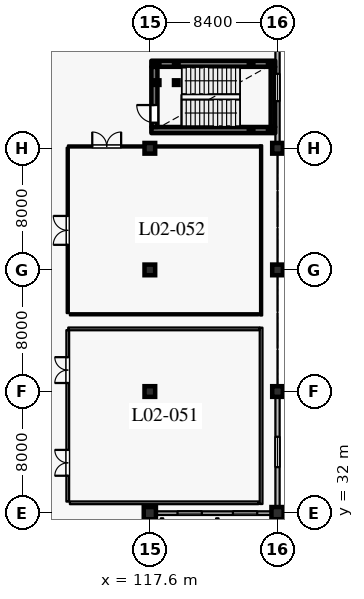
"""IFC4 building model, lengths in metres.
Left out: names, types, materials, properties, quantities, classifications, styles, units other than length and angle.
Written with IfcOpenShell. Run it as: python <this file> out.ifc"""

import sys

from ifc_helpers import new_model, si_unit, direction, frame, frame_2d, origin, origin_2d, place, context, subcontext, project, spatial, rectangle, hollow_rectangle, extrude, element, fill, save


model = new_model("IFC4")
c1 = context("Model", 3, precision=1e-05, world=origin(), true_north=direction((0.0, 1.0)))
c2 = subcontext(c1, "Body", "Model", "MODEL_VIEW")
j1 = project(units=[si_unit("LENGTHUNIT", "METRE"), si_unit("PLANEANGLEUNIT", "RADIAN")], contexts=[c1])
p1 = place(None, origin())
s1 = spatial("IfcSite", under=j1, at=p1, CompositionType="ELEMENT")
p2 = place(p1, origin())
s2 = spatial("IfcBuilding", under=s1, at=p2, CompositionType="ELEMENT")
p3 = place(p2, frame((0.0, 0.0, 11.4)))
s3 = spatial("IfcBuildingStorey", under=s2, at=p3, CompositionType="ELEMENT", Elevation=11.4)
p4 = place(p3, frame((117.6, 32.0, 0.0), z_axis=(0.0, 0.0, 1.0), x_axis=(1.0, 0.0, 0.0)))
e1 = element("IfcColumn", 1, at=p4, inside=s3, PredefinedType="COLUMN", context=c2, shape_type="SweptSolid", body=[
    extrude(rectangle(XDim=0.8, YDim=0.8, at=origin_2d()), origin(), (0.0, 0.0, 1.0), 4.8),
])
for number, where, z_axis, x_axis in (
    (2, (117.6, 40.0, 0.0), (0.0, 0.0, 1.0), (1.0, 0.0, 0.0)),
    (3, (117.6, 48.0, 0.0), (0.0, 0.0, 1.0), (1.0, 0.0, 0.0)),
    (4, (117.6, 56.0, 0.0), (0.0, 0.0, 1.0), (1.0, 0.0, 0.0)),
):
    element("IfcColumn", number, at=place(p3, frame(where, z_axis=z_axis, x_axis=x_axis)), inside=s3, PredefinedType="COLUMN", context=c2, shape_type="SweptSolid", body=[
        extrude(rectangle(XDim=0.7, YDim=0.7, at=origin_2d()), origin(), (0.0, 0.0, 1.0), 4.8),
    ])
p5 = place(p3, frame((126.0, 32.0, 0.0), z_axis=(0.0, 0.0, 1.0), x_axis=(1.0, 0.0, 0.0)))
e5 = element("IfcColumn", 5, at=p5, inside=s3, PredefinedType="COLUMN", context=c2, shape_type="SweptSolid", body=[
    extrude(rectangle(XDim=0.8, YDim=0.8, at=origin_2d()), origin(), (0.0, 0.0, 1.0), 4.8),
])
for number, where, z_axis, x_axis in (
    (6, (126.0, 40.0, 0.0), (0.0, 0.0, 1.0), (1.0, 0.0, 0.0)),
    (7, (126.0, 48.0, 0.0), (0.0, 0.0, 1.0), (1.0, 0.0, 0.0)),
    (8, (126.0, 56.0, 0.0), (0.0, 0.0, 1.0), (1.0, 0.0, 0.0)),
):
    element("IfcColumn", number, at=place(p3, frame(where, z_axis=z_axis, x_axis=x_axis)), inside=s3, PredefinedType="COLUMN", context=c2, shape_type="SweptSolid", body=[
        extrude(rectangle(XDim=0.7, YDim=0.7, at=origin_2d()), origin(), (0.0, 0.0, 1.0), 4.8),
    ])
p6 = place(p3, frame((126.0, 63.65, 0.0), z_axis=(0.0, 0.0, 1.0), x_axis=(0.0, -1.0, 0.0)))
e9 = element("IfcWall", 9, at=p6, inside=s3, PredefinedType="SOLIDWALL", context=c2, shape_type="SweptSolid", body=[
    extrude(rectangle(XDim=7.3, YDim=0.28, at=frame_2d((3.65, 0.0))), origin(), (0.0, 0.0, 1.0), 4.5),
])
p7 = place(p6, frame((2.75, 0.0, 1.0)))
e10 = element("IfcOpeningElement", 10, at=p7, cuts=e9, PredefinedType="OPENING", context=c2, shape_type="SweptSolid", body=[
    extrude(rectangle(XDim=1.8, YDim=1.7, at=frame_2d((0.9, 0.85))), frame((0.0, 0.15, 0.0), z_axis=(0.0, -1.0, 0.0), x_axis=(1.0, 0.0, 0.0)), (0.0, 0.0, 1.0), 0.3),
])
p8 = place(p3, frame((126.0, 39.65, 0.0), z_axis=(0.0, 0.0, 1.0), x_axis=(0.0, -1.0, 0.0)))
e11 = element("IfcWall", 11, at=p8, inside=s3, PredefinedType="SOLIDWALL", context=c2, shape_type="SweptSolid", body=[
    extrude(rectangle(XDim=7.25, YDim=0.28, at=frame_2d((3.625, 0.0))), origin(), (0.0, 0.0, 1.0), 4.5),
])
p9 = place(p8, frame((2.625, 0.0, 1.0)))
e12 = element("IfcOpeningElement", 12, at=p9, cuts=e11, PredefinedType="OPENING", context=c2, shape_type="SweptSolid", body=[
    extrude(rectangle(XDim=2.0, YDim=1.75, at=frame_2d((1.0, 0.875))), frame((0.0, 0.15, 0.0), z_axis=(0.0, -1.0, 0.0), x_axis=(1.0, 0.0, 0.0)), (0.0, 0.0, 1.0), 0.3),
])
p10 = place(p3, frame((118.0, 32.0, 0.0), z_axis=(0.0, 0.0, 1.0), x_axis=(1.0, 0.0, 0.0)))
e13 = element("IfcWall", 13, at=p10, inside=s3, PredefinedType="SOLIDWALL", context=c2, shape_type="SweptSolid", body=[
    extrude(rectangle(XDim=7.6, YDim=0.24, at=frame_2d((3.8, 0.0))), origin(), (0.0, 0.0, 1.0), 4.1),
])
p11 = place(p10, frame((1.42, 0.0, 0.8)))
e14 = element("IfcOpeningElement", 14, at=p11, cuts=e13, PredefinedType="OPENING", context=c2, shape_type="SweptSolid", body=[
    extrude(rectangle(XDim=1.6, YDim=1.6, at=frame_2d((0.8, 0.8))), frame((0.0, 0.13, 0.0), z_axis=(0.0, -1.0, 0.0), x_axis=(1.0, 0.0, 0.0)), (0.0, 0.0, 1.0), 0.26),
])
p12 = place(p10, frame((5.065, 0.0, 0.8)))
e15 = element("IfcOpeningElement", 15, at=p12, cuts=e13, PredefinedType="OPENING", context=c2, shape_type="SweptSolid", body=[
    extrude(rectangle(XDim=1.6, YDim=1.6, at=frame_2d((0.8, 0.8))), frame((0.0, 0.13, 0.0), z_axis=(0.0, -1.0, 0.0), x_axis=(1.0, 0.0, 0.0)), (0.0, 0.0, 1.0), 0.26),
])
p13 = place(p3, frame((126.4, 32.0, 0.0), z_axis=(0.0, 0.0, 1.0), x_axis=(1.0, 0.0, 0.0)))
e16 = element("IfcWall", 16, at=p13, inside=s3, PredefinedType="SOLIDWALL", context=c2, shape_type="SweptSolid", body=[
    extrude(rectangle(XDim=7.6, YDim=0.24, at=frame_2d((3.8, 0.0))), origin(), (0.0, 0.0, 1.0), 4.1),
])
p14 = place(p13, frame((0.615, 0.0, 0.8)))
e17 = element("IfcOpeningElement", 17, at=p14, cuts=e16, PredefinedType="OPENING", context=c2, shape_type="SweptSolid", body=[
    extrude(rectangle(XDim=1.6, YDim=1.6, at=frame_2d((0.8, 0.8))), frame((0.0, 0.13, 0.0), z_axis=(0.0, -1.0, 0.0), x_axis=(1.0, 0.0, 0.0)), (0.0, 0.0, 1.0), 0.26),
])
p15 = place(p13, frame((3.955, 0.0, 0.8)))
e18 = element("IfcOpeningElement", 18, at=p15, cuts=e16, PredefinedType="OPENING", context=c2, shape_type="SweptSolid", body=[
    extrude(rectangle(XDim=1.6, YDim=1.6, at=frame_2d((0.8, 0.8))), frame((0.0, 0.13, 0.0), z_axis=(0.0, -1.0, 0.0), x_axis=(1.0, 0.0, 0.0)), (0.0, 0.0, 1.0), 0.26),
])
p16 = place(p3, frame((117.7, 57.2, 0.0), z_axis=(0.0, 0.0, 1.0), x_axis=(1.0, 0.0, 0.0)))
e19 = element("IfcWall", 19, at=p16, inside=s3, PredefinedType="SHEAR", context=c2, shape_type="SweptSolid", body=[
    extrude(rectangle(XDim=8.15, YDim=0.4, at=frame_2d((4.075, 0.0))), origin(), (0.0, 0.0, 1.0), 4.535),
])
p17 = place(p3, frame((125.7, 57.405, 0.0), z_axis=(0.0, 0.0, 1.0), x_axis=(0.0, 1.0, 0.0)))
e20 = element("IfcWall", 20, at=p17, inside=s3, PredefinedType="SHEAR", context=c2, shape_type="SweptSolid", body=[
    extrude(rectangle(XDim=3.95, YDim=0.3, at=frame_2d((1.975, 0.0))), origin(), (0.0, 0.0, 1.0), 4.535),
])
p18 = place(p3, frame((117.7, 61.56, 0.0), z_axis=(0.0, 0.0, 1.0), x_axis=(1.0, 0.0, 0.0)))
e21 = element("IfcWall", 21, at=p18, inside=s3, PredefinedType="SHEAR", context=c2, shape_type="SweptSolid", body=[
    extrude(rectangle(XDim=8.15, YDim=0.4, at=frame_2d((4.075, 0.0))), origin(), (0.0, 0.0, 1.0), 4.535),
])
p19 = place(p3, frame((117.9, 57.405, 0.0), z_axis=(0.0, 0.0, 1.0), x_axis=(0.0, 1.0, 0.0)))
e22 = element("IfcWall", 22, at=p19, inside=s3, PredefinedType="SHEAR", context=c2, shape_type="SweptSolid", body=[
    extrude(rectangle(XDim=3.95, YDim=0.4, at=frame_2d((1.975, 0.0))), origin(), (0.0, 0.0, 1.0), 4.535),
])
p20 = place(p19, frame((0.28, 0.0, 0.0)))
e23 = element("IfcOpeningElement", 23, at=p20, cuts=e22, PredefinedType="OPENING", context=c2, shape_type="SweptSolid", body=[
    extrude(rectangle(XDim=1.16, YDim=2.2, at=frame_2d((0.58, 1.1))), frame((0.0, 0.21, 0.0), z_axis=(0.0, -1.0, 0.0), x_axis=(1.0, 0.0, 0.0)), (0.0, 0.0, 1.0), 0.42),
])
for number, where, z_axis, x_axis in (
    (24, (118.08, 60.32, 0.0), (0.0, 0.0, 1.0), (1.0, 0.0, 0.0)),
    (25, (118.08, 61.56, 0.0), (0.0, 0.0, 1.0), (1.0, 0.0, 0.0)),
    (26, (119.34, 60.32, 0.0), (0.0, 0.0, 1.0), (1.0, 0.0, 0.0)),
    (27, (119.34, 61.56, 0.0), (0.0, 0.0, 1.0), (1.0, 0.0, 0.0)),
):
    element("IfcColumn", number, at=place(p3, frame(where, z_axis=z_axis, x_axis=x_axis)), inside=s3, PredefinedType="COLUMN", context=c2, shape_type="SweptSolid", body=[
        extrude(hollow_rectangle(XDim=0.3, YDim=0.3, WallThickness=0.012, at=origin_2d()), origin(), (0.0, 0.0, 1.0), 4.62),
    ])
for number, where, z_axis, x_axis in (
    (28, (124.26, 57.2, -2.7), (0.0, 0.0, 1.0), (1.0, 0.0, 0.0)),
    (29, (124.26, 61.56, -2.7), (0.0, 0.0, 1.0), (1.0, 0.0, 0.0)),
    (30, (125.52, 57.2, -2.7), (0.0, 0.0, 1.0), (1.0, 0.0, 0.0)),
    (31, (125.52, 61.56, -2.7), (0.0, 0.0, 1.0), (1.0, 0.0, 0.0)),
):
    element("IfcColumn", number, at=place(p3, frame(where, z_axis=z_axis, x_axis=x_axis)), inside=s3, PredefinedType="COLUMN", context=c2, shape_type="SweptSolid", body=[
        extrude(hollow_rectangle(XDim=0.3, YDim=0.3, WallThickness=0.012, at=origin_2d()), origin(), (0.0, 0.0, 1.0), 4.92),
    ])
for number, where, z_axis, x_axis in (
    (32, (118.4, 25.16, 0.0), (0.0, 0.0, 1.0), (0.0, 1.0, 0.0)),
    (33, (122.04, 25.16, 0.0), (0.0, 0.0, 1.0), (0.0, 1.0, 0.0)),
    (34, (125.69, 25.16, 0.0), (0.0, 0.0, 1.0), (0.0, 1.0, 0.0)),
):
    element("IfcWall", number, at=place(p3, frame(where, z_axis=z_axis, x_axis=x_axis)), inside=s3, PredefinedType="PARTITIONING", context=c2, shape_type="SweptSolid", body=[
        extrude(rectangle(XDim=6.5, YDim=0.16, at=frame_2d((3.25, 0.0))), origin(), (0.0, 0.0, 1.0), 4.535),
    ])
p21 = place(p3, frame((112.2, 32.76, 0.0), z_axis=(0.0, 0.0, 1.0), x_axis=(0.0, 1.0, 0.0)))
e35 = element("IfcWall", 35, at=p21, inside=s3, PredefinedType="PARTITIONING", context=c2, shape_type="SweptSolid", body=[
    extrude(rectangle(XDim=11.28, YDim=0.18, at=frame_2d((5.64, 0.0))), origin(), (0.0, 0.0, 1.0), 4.535),
])
p22 = place(p21, frame((1.7, 0.0, 0.0)))
e36 = element("IfcOpeningElement", 36, at=p22, cuts=e35, PredefinedType="OPENING", context=c2, shape_type="SweptSolid", body=[
    extrude(rectangle(XDim=1.7, YDim=2.3, at=frame_2d((0.85, 1.15))), frame((0.0, 0.1, 0.0), z_axis=(0.0, -1.0, 0.0), x_axis=(1.0, 0.0, 0.0)), (0.0, 0.0, 1.0), 0.2),
])
p23 = place(p21, frame((7.8, 0.0, 0.0)))
e37 = element("IfcOpeningElement", 37, at=p23, cuts=e35, PredefinedType="OPENING", context=c2, shape_type="SweptSolid", body=[
    extrude(rectangle(XDim=1.7, YDim=2.3, at=frame_2d((0.85, 1.15))), frame((0.0, 0.1, 0.0), z_axis=(0.0, -1.0, 0.0), x_axis=(1.0, 0.0, 0.0)), (0.0, 0.0, 1.0), 0.2),
])
p24 = place(p3, frame((112.34, 32.68, 0.0), z_axis=(0.0, 0.0, 1.0), x_axis=(1.0, 0.0, 0.0)))
e38 = element("IfcWall", 38, at=p24, inside=s3, PredefinedType="PARTITIONING", context=c2, shape_type="SweptSolid", body=[
    extrude(rectangle(XDim=12.41, YDim=0.18, at=frame_2d((6.205, 0.0))), origin(), (0.0, 0.0, 1.0), 4.535),
])
p25 = place(p3, frame((112.2, 45.16, 0.0), z_axis=(0.0, 0.0, 1.0), x_axis=(0.0, 1.0, 0.0)))
e39 = element("IfcWall", 39, at=p25, inside=s3, PredefinedType="PARTITIONING", context=c2, shape_type="SweptSolid", body=[
    extrude(rectangle(XDim=10.88, YDim=0.14, at=frame_2d((5.44, 0.0))), origin(), (0.0, 0.0, 1.0), 4.535),
])
p26 = place(p25, frame((4.49, 0.0, 0.0)))
e40 = element("IfcOpeningElement", 40, at=p26, cuts=e39, PredefinedType="OPENING", context=c2, shape_type="SweptSolid", body=[
    extrude(rectangle(XDim=1.9, YDim=2.4, at=frame_2d((0.95, 1.2))), frame((0.0, 0.08, 0.0), z_axis=(0.0, -1.0, 0.0), x_axis=(1.0, 0.0, 0.0)), (0.0, 0.0, 1.0), 0.16),
])
p27 = place(p3, frame((112.34, 45.08, 0.0), z_axis=(0.0, 0.0, 1.0), x_axis=(1.0, 0.0, 0.0)))
e41 = element("IfcWall", 41, at=p27, inside=s3, PredefinedType="PARTITIONING", context=c2, shape_type="SweptSolid", body=[
    extrude(rectangle(XDim=12.41, YDim=0.14, at=frame_2d((6.205, 0.0))), origin(), (0.0, 0.0, 1.0), 4.535),
])
p28 = place(p3, frame((124.92, 32.6, 0.0), z_axis=(0.0, 0.0, 1.0), x_axis=(0.0, 1.0, 0.0)))
e42 = element("IfcWall", 42, at=p28, inside=s3, PredefinedType="PARTITIONING", context=c2, shape_type="SweptSolid", body=[
    extrude(rectangle(XDim=11.6, YDim=0.18, at=frame_2d((5.8, 0.0))), origin(), (0.0, 0.0, 1.0), 4.535),
])
p29 = place(p3, frame((112.232, 44.12, 0.0), z_axis=(0.0, 0.0, 1.0), x_axis=(1.0, 0.0, 0.0)))
e43 = element("IfcWall", 43, at=p29, inside=s3, PredefinedType="PARTITIONING", context=c2, shape_type="SweptSolid", body=[
    extrude(rectangle(XDim=12.598, YDim=0.18, at=frame_2d((6.299, 0.0))), origin(), (0.0, 0.0, 1.0), 4.535),
])
p30 = place(p3, frame((124.92, 45.0, 0.0), z_axis=(0.0, 0.0, 1.0), x_axis=(0.0, 1.0, 0.0)))
e44 = element("IfcWall", 44, at=p30, inside=s3, PredefinedType="PARTITIONING", context=c2, shape_type="SweptSolid", body=[
    extrude(rectangle(XDim=11.2, YDim=0.14, at=frame_2d((5.6, 0.0))), origin(), (0.0, 0.0, 1.0), 4.535),
])
p31 = place(p3, frame((112.212, 56.12, 0.0), z_axis=(0.0, 0.0, 1.0), x_axis=(1.0, 0.0, 0.0)))
e45 = element("IfcWall", 45, at=p31, inside=s3, PredefinedType="PARTITIONING", context=c2, shape_type="SweptSolid", body=[
    extrude(rectangle(XDim=5.038, YDim=0.14, at=frame_2d((2.519, 0.0))), origin(), (0.0, 0.0, 1.0), 3.85),
])
p32 = place(p31, frame((1.6, 0.0, 0.0)))
e46 = element("IfcOpeningElement", 46, at=p32, cuts=e45, PredefinedType="OPENING", context=c2, shape_type="SweptSolid", body=[
    extrude(rectangle(XDim=1.9, YDim=2.4, at=frame_2d((0.95, 1.2))), frame((0.0, 0.08, 0.0), z_axis=(0.0, -1.0, 0.0), x_axis=(1.0, 0.0, 0.0)), (0.0, 0.0, 1.0), 0.16),
])
p33 = place(p3, frame((117.95, 56.12, 0.0), z_axis=(0.0, 0.0, 1.0), x_axis=(1.0, 0.0, 0.0)))
e47 = element("IfcWall", 47, at=p33, inside=s3, PredefinedType="PARTITIONING", context=c2, shape_type="SweptSolid", body=[
    extrude(rectangle(XDim=6.9, YDim=0.14, at=frame_2d((3.45, 0.0))), origin(), (0.0, 0.0, 1.0), 3.85),
])
p34 = place(p7, origin())
e48 = element("IfcWindow", 48, at=p34, inside=s3, PartitioningType="DOUBLE_PANEL_VERTICAL", PredefinedType="WINDOW", context=c2, shape_type="SweptSolid", body=[
    extrude(rectangle(XDim=1.8, YDim=1.7, at=frame_2d((0.9, 0.85))), frame((0.0, 0.03, 0.0), z_axis=(0.0, -1.0, 0.0), x_axis=(1.0, 0.0, 0.0)), (0.0, 0.0, 1.0), 0.06),
])
fill(e10, e48)
p35 = place(p9, origin())
e49 = element("IfcWindow", 49, at=p35, inside=s3, PartitioningType="DOUBLE_PANEL_VERTICAL", PredefinedType="WINDOW", context=c2, shape_type="SweptSolid", body=[
    extrude(rectangle(XDim=2.0, YDim=1.75, at=frame_2d((1.0, 0.875))), frame((0.0, 0.03, 0.0), z_axis=(0.0, -1.0, 0.0), x_axis=(1.0, 0.0, 0.0)), (0.0, 0.0, 1.0), 0.06),
])
fill(e12, e49)
p36 = place(p11, origin())
e50 = element("IfcWindow", 50, at=p36, inside=s3, PartitioningType="SINGLE_PANEL", PredefinedType="WINDOW", context=c2, shape_type="SweptSolid", body=[
    extrude(rectangle(XDim=1.6, YDim=1.6, at=frame_2d((0.8, 0.8))), frame((0.0, 0.03, 0.0), z_axis=(0.0, -1.0, 0.0), x_axis=(1.0, 0.0, 0.0)), (0.0, 0.0, 1.0), 0.06),
])
fill(e14, e50)
p37 = place(p12, origin())
e51 = element("IfcWindow", 51, at=p37, inside=s3, PartitioningType="SINGLE_PANEL", PredefinedType="WINDOW", context=c2, shape_type="SweptSolid", body=[
    extrude(rectangle(XDim=1.6, YDim=1.6, at=frame_2d((0.8, 0.8))), frame((0.0, 0.03, 0.0), z_axis=(0.0, -1.0, 0.0), x_axis=(1.0, 0.0, 0.0)), (0.0, 0.0, 1.0), 0.06),
])
fill(e15, e51)
p38 = place(p20, origin())
e52 = element("IfcDoor", 52, at=p38, inside=s3, OperationType="SINGLE_SWING_RIGHT", PredefinedType="DOOR", context=c2, shape_type="SweptSolid", body=[
    extrude(rectangle(XDim=1.16, YDim=2.2, at=frame_2d((0.58, 1.1))), frame((0.0, 0.025, 0.0), z_axis=(0.0, -1.0, 0.0), x_axis=(1.0, 0.0, 0.0)), (0.0, 0.0, 1.0), 0.05),
])
fill(e23, e52)
p39 = place(p22, origin())
e53 = element("IfcDoor", 53, at=p39, inside=s3, OperationType="DOUBLE_DOOR_SINGLE_SWING", PredefinedType="DOOR", context=c2, shape_type="SweptSolid", body=[
    extrude(rectangle(XDim=1.7, YDim=2.3, at=frame_2d((0.85, 1.15))), frame((0.0, 0.025, 0.0), z_axis=(0.0, -1.0, 0.0), x_axis=(1.0, 0.0, 0.0)), (0.0, 0.0, 1.0), 0.05),
])
fill(e36, e53)
p40 = place(p26, origin())
e54 = element("IfcDoor", 54, at=p40, inside=s3, OperationType="DOUBLE_DOOR_SINGLE_SWING", PredefinedType="DOOR", context=c2, shape_type="SweptSolid", body=[
    extrude(rectangle(XDim=1.9, YDim=2.4, at=frame_2d((0.95, 1.2))), frame((0.0, 0.025, 0.0), z_axis=(0.0, -1.0, 0.0), x_axis=(1.0, 0.0, 0.0)), (0.0, 0.0, 1.0), 0.05),
])
fill(e40, e54)
p41 = place(p23, origin())
e55 = element("IfcDoor", 55, at=p41, inside=s3, OperationType="DOUBLE_DOOR_SINGLE_SWING", PredefinedType="DOOR", context=c2, shape_type="SweptSolid", body=[
    extrude(rectangle(XDim=1.7, YDim=2.3, at=frame_2d((0.85, 1.15))), frame((0.0, 0.025, 0.0), z_axis=(0.0, -1.0, 0.0), x_axis=(1.0, 0.0, 0.0)), (0.0, 0.0, 1.0), 0.05),
])
fill(e37, e55)
p42 = place(p32, origin())
e56 = element("IfcDoor", 56, at=p42, inside=s3, OperationType="DOUBLE_DOOR_SINGLE_SWING", PredefinedType="DOOR", context=c2, shape_type="SweptSolid", body=[
    extrude(rectangle(XDim=1.9, YDim=2.4, at=frame_2d((0.95, 1.2))), frame((0.0, 0.025, 0.0), z_axis=(0.0, -1.0, 0.0), x_axis=(1.0, 0.0, 0.0)), (0.0, 0.0, 1.0), 0.05),
])
fill(e46, e56)
save(model, sys.argv[1])
